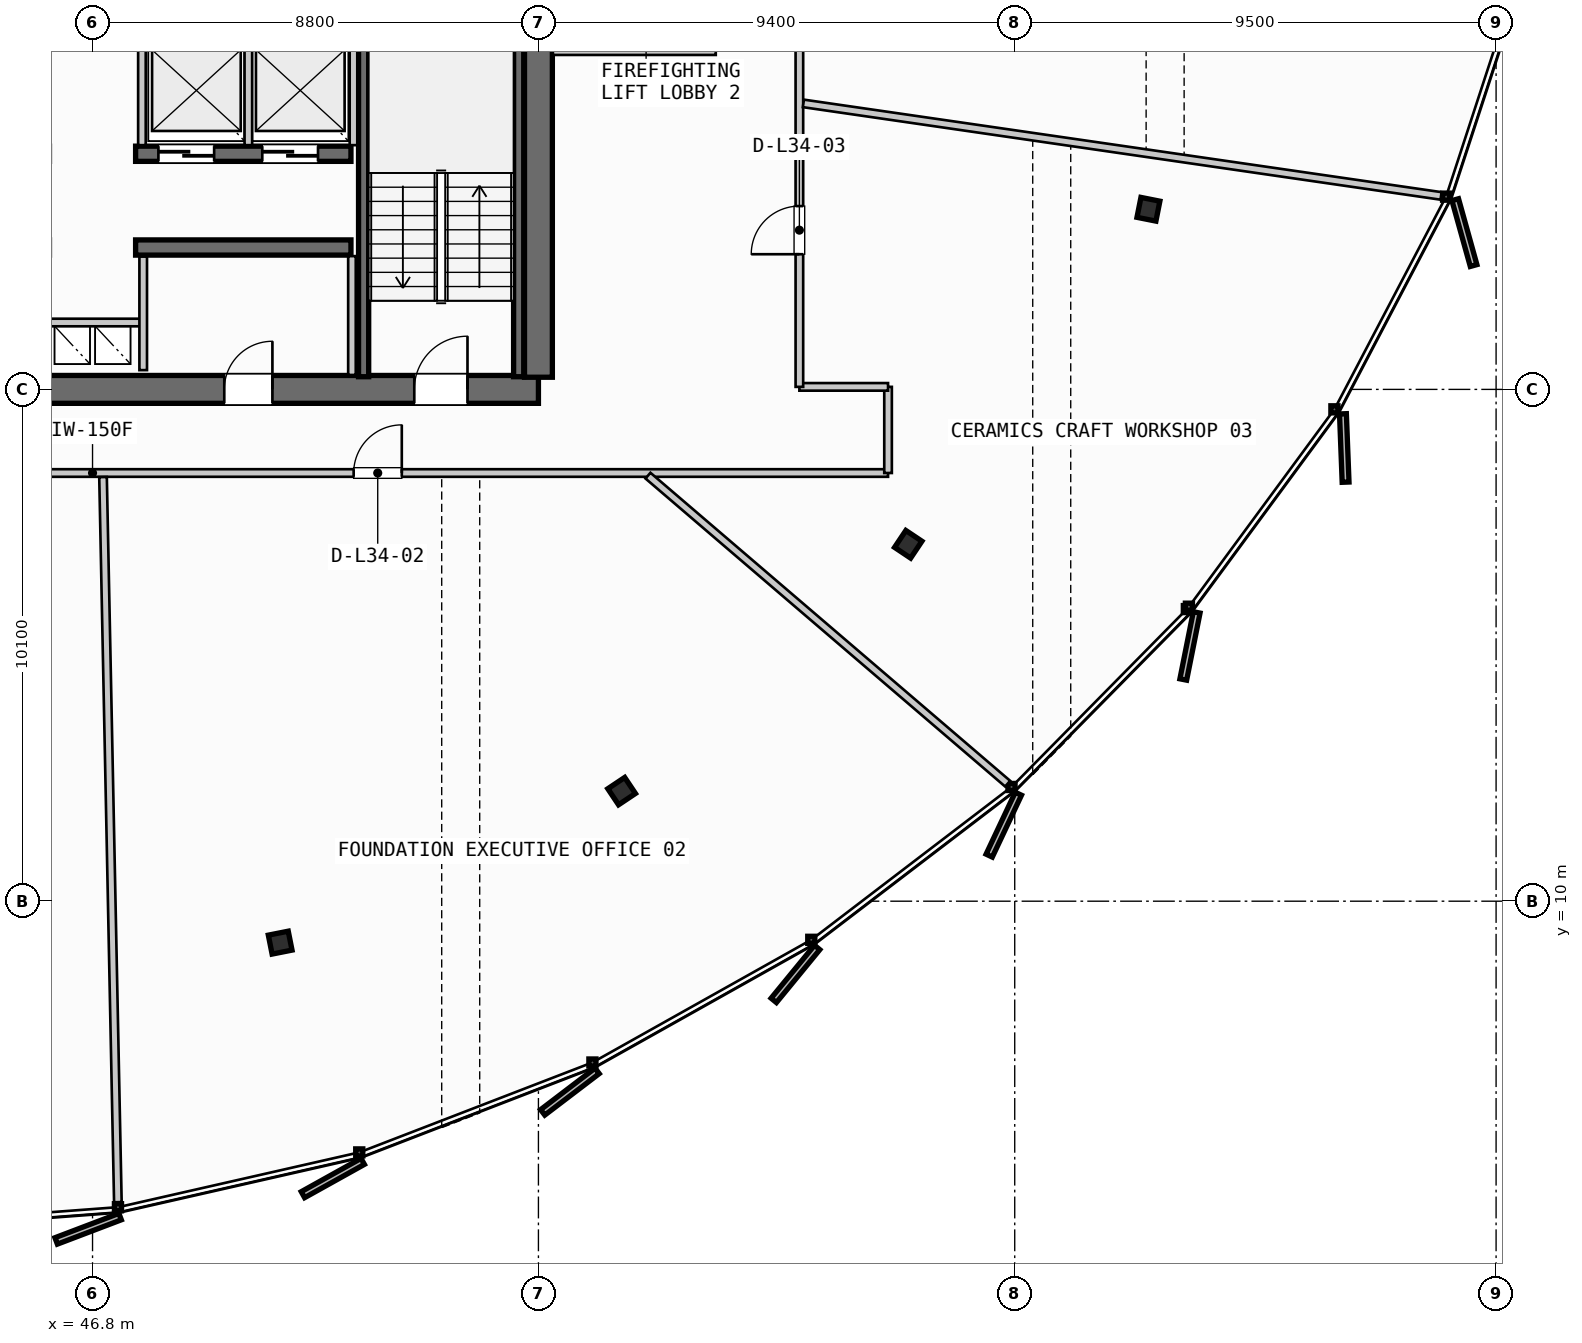
"""IFC4 building model, lengths in metres.
Left out: names, types, materials, properties, quantities, classifications, styles, units other than length and angle.
Written with IfcOpenShell. Run it as: python <this file> out.ifc"""

import sys

from ifc_helpers import new_model, si_unit, direction, frame, frame_2d, origin, origin_2d, place, context, subcontext, project, spatial, rectangle, i_section, extrude, source, transform, mapped, element, fill, save


model = new_model("IFC4")
c1 = context("Model", 3, precision=1e-05, world=origin(), true_north=direction((0.0, 1.0)))
c2 = subcontext(c1, "Body", "Model", "MODEL_VIEW")
j1 = project(units=[si_unit("LENGTHUNIT", "METRE"), si_unit("PLANEANGLEUNIT", "RADIAN")], contexts=[c1])
p1 = place(None, origin())
s1 = spatial("IfcSite", under=j1, at=p1, CompositionType="ELEMENT")
p2 = place(p1, origin())
s2 = spatial("IfcBuilding", under=s1, at=p2, CompositionType="ELEMENT")
p3 = place(p2, frame((0.0, 0.0, 135.9)))
s3 = spatial("IfcBuildingStorey", under=s2, at=p3, CompositionType="ELEMENT", Elevation=135.9)
p4 = place(p3, frame((38.0, 20.1, 0.0), z_axis=(0.0, 0.0, 1.0), x_axis=(1.0, 0.0, 0.0)))
e1 = element("IfcWall", 1, at=p4, inside=s3, PredefinedType="SHEAR", context=c2, shape_type="SweptSolid", body=[
    extrude(rectangle(XDim=17.6, YDim=0.55, at=frame_2d((8.8, 0.0))), origin(), (0.0, 0.0, 1.0), 3.3),
])
p5 = place(p4, frame((1.4, 0.0, 0.0)))
e2 = element("IfcOpeningElement", 2, at=p5, cuts=e1, PredefinedType="OPENING", context=c2, shape_type="SweptSolid", body=[
    extrude(rectangle(XDim=1.05, YDim=2.15, at=frame_2d((0.525, 1.075))), frame((0.0, 0.285, 0.0), z_axis=(0.0, -1.0, 0.0), x_axis=(1.0, 0.0, 0.0)), (0.0, 0.0, 1.0), 0.57),
])
p6 = place(p4, frame((15.15, 0.0, 0.0)))
e3 = element("IfcOpeningElement", 3, at=p6, cuts=e1, PredefinedType="OPENING", context=c2, shape_type="SweptSolid", body=[
    extrude(rectangle(XDim=1.05, YDim=2.15, at=frame_2d((0.525, 1.075))), frame((0.0, 0.285, 0.0), z_axis=(0.0, -1.0, 0.0), x_axis=(1.0, 0.0, 0.0)), (0.0, 0.0, 1.0), 0.57),
])
p7 = place(p4, frame((5.25, 0.0, 0.0)))
e4 = element("IfcOpeningElement", 4, at=p7, cuts=e1, PredefinedType="OPENING", context=c2, shape_type="SweptSolid", body=[
    extrude(rectangle(XDim=0.95, YDim=2.15, at=frame_2d((0.475, 1.075))), frame((0.0, 0.285, 0.0), z_axis=(0.0, -1.0, 0.0), x_axis=(1.0, 0.0, 0.0)), (0.0, 0.0, 1.0), 0.57),
])
p8 = place(p4, frame((11.4, 0.0, 0.0)))
e5 = element("IfcOpeningElement", 5, at=p8, cuts=e1, PredefinedType="OPENING", context=c2, shape_type="SweptSolid", body=[
    extrude(rectangle(XDim=0.95, YDim=2.15, at=frame_2d((0.475, 1.075))), frame((0.0, 0.285, 0.0), z_axis=(0.0, -1.0, 0.0), x_axis=(1.0, 0.0, 0.0)), (0.0, 0.0, 1.0), 0.57),
])
p9 = place(p3, frame((55.6, 20.34, 0.0), z_axis=(0.0, 0.0, 1.0), x_axis=(0.0, 1.0, 0.0)))
e6 = element("IfcWall", 6, at=p9, inside=s3, PredefinedType="SHEAR", context=c2, shape_type="SweptSolid", body=[
    extrude(rectangle(XDim=14.92, YDim=0.55, at=frame_2d((7.46, 0.0))), origin(), (0.0, 0.0, 1.0), 3.3),
])
p10 = place(p9, frame((12.71, 0.0, 0.0)))
e7 = element("IfcOpeningElement", 7, at=p10, cuts=e6, PredefinedType="OPENING", context=c2, shape_type="SweptSolid", body=[
    extrude(rectangle(XDim=1.05, YDim=2.15, at=frame_2d((0.525, 1.075))), frame((0.0, 0.285, 0.0), z_axis=(0.0, -1.0, 0.0), x_axis=(1.0, 0.0, 0.0)), (0.0, 0.0, 1.0), 0.57),
])
p11 = place(p9, frame((8.61, 0.0, 0.0)))
e8 = element("IfcOpeningElement", 8, at=p11, cuts=e6, PredefinedType="OPENING", context=c2, shape_type="SweptSolid", body=[
    extrude(rectangle(XDim=1.1, YDim=2.2, at=frame_2d((0.55, 1.1))), frame((0.0, 0.285, 0.0), z_axis=(0.0, -1.0, 0.0), x_axis=(1.0, 0.0, 0.0)), (0.0, 0.0, 1.0), 0.57),
])
p12 = place(p3, frame((47.65, 22.9, 0.0), z_axis=(0.0, 0.0, 1.0), x_axis=(1.0, 0.0, 0.0)))
e9 = element("IfcWall", 9, at=p12, inside=s3, PredefinedType="SHEAR", context=c2, shape_type="SweptSolid", body=[
    extrude(rectangle(XDim=4.25, YDim=0.3, at=frame_2d((2.125, 0.0))), origin(), (0.0, 0.0, 1.0), 3.3),
])
p13 = place(p3, frame((47.65, 24.75, 0.0), z_axis=(0.0, 0.0, 1.0), x_axis=(1.0, 0.0, 0.0)))
e10 = element("IfcWall", 10, at=p13, inside=s3, PredefinedType="SHEAR", context=c2, shape_type="SweptSolid", body=[
    extrude(rectangle(XDim=4.25, YDim=0.3, at=frame_2d((2.125, 0.0))), origin(), (0.0, 0.0, 1.0), 3.3),
])
p14 = place(p13, frame((0.45, 0.0, 0.0)))
e11 = element("IfcOpeningElement", 11, at=p14, cuts=e10, PredefinedType="OPENING", context=c2, shape_type="SweptSolid", body=[
    extrude(rectangle(XDim=1.1, YDim=2.2, at=frame_2d((0.55, 1.1))), frame((0.0, 0.16, 0.0), z_axis=(0.0, -1.0, 0.0), x_axis=(1.0, 0.0, 0.0)), (0.0, 0.0, 1.0), 0.32),
])
p15 = place(p13, frame((2.5, 0.0, 0.0)))
e12 = element("IfcOpeningElement", 12, at=p15, cuts=e10, PredefinedType="OPENING", context=c2, shape_type="SweptSolid", body=[
    extrude(rectangle(XDim=1.1, YDim=2.2, at=frame_2d((0.55, 1.1))), frame((0.0, 0.16, 0.0), z_axis=(0.0, -1.0, 0.0), x_axis=(1.0, 0.0, 0.0)), (0.0, 0.0, 1.0), 0.32),
])
m1 = source(origin(), c2, "Body", "SweptSolid", [
    extrude(i_section(OverallWidth=0.401, OverallDepth=0.381, WebThickness=0.032, FlangeThickness=0.051, FilletRadius=0.015, at=origin_2d()), origin(), (0.0, 0.0, 1.0), 3.3),
])
for number, where, z_axis, x_axis in (
    (13, (50.503, 9.182, 0.0), (0.0, 0.0, 1.0), (0.195, -0.981, 0.0)),
    (14, (57.242, 12.172, 0.0), (0.0, 0.0, 1.0), (0.556, -0.831, 0.0)),
    (15, (62.899, 17.043, 0.0), (0.0, 0.0, 1.0), (0.831, -0.556, 0.0)),
    (16, (67.639, 23.655, 0.0), (0.0, 0.0, 1.0), (0.981, -0.195, 0.0)),
):
    element("IfcColumn", number, at=place(p3, frame(where, z_axis=z_axis, x_axis=x_axis)), inside=s3, PredefinedType="COLUMN", context=c2, shape_type="MappedRepresentation", body=[
        mapped(m1, transform((0.0, 0.0, 0.0), scale=1.0)),
    ])
for number, where, z_axis, x_axis in (
    (17, (55.21, 27.7, 0.0), (0.0, 0.0, 1.0), (0.0, -1.0, 0.0)),
    (18, (52.15, 20.35, 0.0), (0.0, 0.0, 1.0), (0.0, 1.0, 0.0)),
):
    element("IfcWall", number, at=place(p3, frame(where, z_axis=z_axis, x_axis=x_axis)), inside=s3, PredefinedType="SHEAR", context=c2, shape_type="SweptSolid", body=[
        extrude(rectangle(XDim=7.35, YDim=0.2, at=frame_2d((3.675, 0.0))), origin(), (0.0, 0.0, 1.0), 3.3),
    ])
p16 = place(p3, frame((45.8, 21.42, 0.0), z_axis=(0.0, 0.0, 1.0), x_axis=(1.0, 0.0, 0.0)))
e19 = element("IfcWall", 19, at=p16, inside=s3, PredefinedType="PARTITIONING", context=c2, shape_type="SweptSolid", body=[
    extrude(rectangle(XDim=2.0, YDim=0.15, at=frame_2d((1.0, 0.0))), origin(), (0.0, 0.0, 1.0), 2.445),
])
p17 = place(p3, frame((47.8, 20.48, 0.0), z_axis=(0.0, 0.0, 1.0), x_axis=(0.0, 1.0, 0.0)))
e20 = element("IfcWall", 20, at=p17, inside=s3, PredefinedType="PARTITIONING", context=c2, shape_type="SweptSolid", body=[
    extrude(rectangle(XDim=2.24, YDim=0.15, at=frame_2d((1.12, 0.0))), origin(), (0.0, 0.0, 1.0), 2.445),
])
p18 = place(p3, frame((55.885, 26.8, 0.0), z_axis=(0.0, 0.0, 1.0), x_axis=(1.0, 0.0, 0.0)))
e21 = element("IfcWall", 21, at=p18, inside=s3, PredefinedType="PARTITIONING", context=c2, shape_type="SweptSolid", body=[
    extrude(rectangle(XDim=3.215, YDim=0.2, at=frame_2d((1.607, 0.0))), origin(), (0.0, 0.0, 1.0), 2.445),
])
p19 = place(p3, frame((51.92, 20.385, 0.0), z_axis=(0.0, 0.0, 1.0), x_axis=(0.0, 1.0, 0.0)))
e22 = element("IfcWall", 22, at=p19, inside=s3, PredefinedType="PARTITIONING", context=c2, shape_type="SweptSolid", body=[
    extrude(rectangle(XDim=2.345, YDim=0.15, at=frame_2d((1.172, 0.0))), origin(), (0.0, 0.0, 1.0), 2.445),
])
for number, where, z_axis, x_axis in (
    (23, (47.775, 24.92, 0.0), (0.0, 0.0, 1.0), (0.0, 1.0, 0.0)),
    (24, (49.875, 24.92, 0.0), (0.0, 0.0, 1.0), (0.0, 1.0, 0.0)),
    (25, (51.95, 24.92, 0.0), (0.0, 0.0, 1.0), (0.0, 1.0, 0.0)),
):
    element("IfcWall", number, at=place(p3, frame(where, z_axis=z_axis, x_axis=x_axis)), inside=s3, PredefinedType="PARTITIONING", context=c2, shape_type="SweptSolid", body=[
        extrude(rectangle(XDim=2.32, YDim=0.15, at=frame_2d((1.16, 0.0))), origin(), (0.0, 0.0, 1.0), 2.445),
    ])
p20 = place(p3, frame((31.1, 18.45, 0.0), z_axis=(0.0, 0.0, 1.0), x_axis=(1.0, 0.0, 0.0)))
e26 = element("IfcWall", 26, at=p20, inside=s3, PredefinedType="PARTITIONING", context=c2, shape_type="SweptSolid", body=[
    extrude(rectangle(XDim=31.4, YDim=0.15, at=frame_2d((15.7, 0.0))), origin(), (0.0, 0.0, 1.0), 2.445),
])
p21 = place(p20, frame((10.031, 0.0, 0.0)))
e27 = element("IfcOpeningElement", 27, at=p21, cuts=e26, PredefinedType="OPENING", context=c2, shape_type="SweptSolid", body=[
    extrude(rectangle(XDim=0.95, YDim=2.15, at=frame_2d((0.475, 1.075))), frame((0.0, 0.085, 0.0), z_axis=(0.0, -1.0, 0.0), x_axis=(1.0, 0.0, 0.0)), (0.0, 0.0, 1.0), 0.17),
])
p22 = place(p20, frame((20.854, 0.0, 0.0)))
e28 = element("IfcOpeningElement", 28, at=p22, cuts=e26, PredefinedType="OPENING", context=c2, shape_type="SweptSolid", body=[
    extrude(rectangle(XDim=0.95, YDim=2.15, at=frame_2d((0.475, 1.075))), frame((0.0, 0.085, 0.0), z_axis=(0.0, -1.0, 0.0), x_axis=(1.0, 0.0, 0.0)), (0.0, 0.0, 1.0), 0.17),
])
p23 = place(p3, frame((62.5, 18.45, 0.0), z_axis=(0.0, 0.0, 1.0), x_axis=(0.0, 1.0, 0.0)))
e29 = element("IfcWall", 29, at=p23, inside=s3, PredefinedType="PARTITIONING", context=c2, shape_type="SweptSolid", body=[
    extrude(rectangle(XDim=1.7, YDim=0.15, at=frame_2d((0.85, 0.0))), origin(), (0.0, 0.0, 1.0), 2.445),
])
p24 = place(p3, frame((62.5, 20.15, 0.0), z_axis=(0.0, 0.0, 1.0), x_axis=(-1.0, 0.0, 0.0)))
e30 = element("IfcWall", 30, at=p24, inside=s3, PredefinedType="PARTITIONING", context=c2, shape_type="SweptSolid", body=[
    extrude(rectangle(XDim=1.75, YDim=0.15, at=frame_2d((0.875, 0.0))), origin(), (0.0, 0.0, 1.0), 2.445),
])
p25 = place(p3, frame((60.75, 20.15, 0.0), z_axis=(0.0, 0.0, 1.0), x_axis=(0.0, 1.0, 0.0)))
e31 = element("IfcWall", 31, at=p25, inside=s3, PredefinedType="PARTITIONING", context=c2, shape_type="SweptSolid", body=[
    extrude(rectangle(XDim=15.3, YDim=0.15, at=frame_2d((7.65, 0.0))), origin(), (0.0, 0.0, 1.0), 2.445),
])
p26 = place(p25, frame((2.617, 0.0, 0.0)))
e32 = element("IfcOpeningElement", 32, at=p26, cuts=e31, PredefinedType="OPENING", context=c2, shape_type="SweptSolid", body=[
    extrude(rectangle(XDim=0.95, YDim=2.15, at=frame_2d((0.475, 1.075))), frame((0.0, 0.085, 0.0), z_axis=(0.0, -1.0, 0.0), x_axis=(1.0, 0.0, 0.0)), (0.0, 0.0, 1.0), 0.17),
])
p27 = place(p25, frame((9.686, 0.0, 0.0)))
e33 = element("IfcOpeningElement", 33, at=p27, cuts=e31, PredefinedType="OPENING", context=c2, shape_type="SweptSolid", body=[
    extrude(rectangle(XDim=0.95, YDim=2.15, at=frame_2d((0.475, 1.075))), frame((0.0, 0.085, 0.0), z_axis=(0.0, -1.0, 0.0), x_axis=(1.0, 0.0, 0.0)), (0.0, 0.0, 1.0), 0.17),
])
p28 = place(p3, frame((47.007, 18.37, 0.0), z_axis=(0.0, 0.0, 1.0), x_axis=(0.020469333541, -0.999790481243, 0.0)))
e34 = element("IfcWall", 34, at=p28, inside=s3, PredefinedType="PARTITIONING", context=c2, shape_type="SweptSolid", body=[
    extrude(rectangle(XDim=14.312, YDim=0.15, at=frame_2d((7.156, 0.0))), origin(), (0.0, 0.0, 1.0), 2.445),
])
p29 = place(p3, frame((57.762, 18.398, 0.0), z_axis=(0.0, 0.0, 1.0), x_axis=(0.759568143106, -0.650427733095, 0.0)))
e35 = element("IfcWall", 35, at=p29, inside=s3, PredefinedType="PARTITIONING", context=c2, shape_type="SweptSolid", body=[
    extrude(rectangle(XDim=9.346, YDim=0.15, at=frame_2d((4.673, 0.0))), origin(), (0.0, 0.0, 1.0), 2.445),
])
p30 = place(p3, frame((60.829, 25.744, 0.0), z_axis=(0.0, 0.0, 1.0), x_axis=(0.989638035288, -0.143584675757, 0.0)))
e36 = element("IfcWall", 36, at=p30, inside=s3, PredefinedType="PARTITIONING", context=c2, shape_type="SweptSolid", body=[
    extrude(rectangle(XDim=12.717, YDim=0.15, at=frame_2d((6.358, 0.0))), origin(), (0.0, 0.0, 1.0), 2.445),
])
m2 = source(origin(), c2, "Body", "SweptSolid", [
    extrude(rectangle(XDim=1.05, YDim=2.15, at=frame_2d((0.525, 1.075))), frame((0.0, 0.025, 0.0), z_axis=(0.0, -1.0, 0.0), x_axis=(1.0, 0.0, 0.0)), (0.0, 0.0, 1.0), 0.05),
])
p31 = place(p6, origin())
e37 = element("IfcDoor", 37, at=p31, inside=s3, OperationType="SINGLE_SWING_RIGHT", PredefinedType="DOOR", context=c2, shape_type="MappedRepresentation", body=[
    mapped(m2, transform((0.0, 0.0, 0.0), scale=1.0)),
])
fill(e3, e37)
m3 = source(origin(), c2, "Body", "SweptSolid", [
    extrude(rectangle(XDim=0.95, YDim=2.15, at=frame_2d((0.475, 1.075))), frame((0.0, 0.025, 0.0), z_axis=(0.0, -1.0, 0.0), x_axis=(1.0, 0.0, 0.0)), (0.0, 0.0, 1.0), 0.05),
])
p32 = place(p8, origin())
e38 = element("IfcDoor", 38, at=p32, inside=s3, OperationType="SINGLE_SWING_RIGHT", PredefinedType="DOOR", context=c2, shape_type="MappedRepresentation", body=[
    mapped(m3, transform((0.0, 0.0, 0.0), scale=1.0)),
])
fill(e5, e38)
m4 = source(origin(), c2, "Body", "SweptSolid", [
    extrude(rectangle(XDim=1.1, YDim=2.2, at=frame_2d((0.55, 1.1))), frame((0.0, 0.025, 0.0), z_axis=(0.0, -1.0, 0.0), x_axis=(1.0, 0.0, 0.0)), (0.0, 0.0, 1.0), 0.05),
])
p33 = place(p14, origin())
e39 = element("IfcDoor", 39, at=p33, inside=s3, OperationType="SLIDING_TO_RIGHT", PredefinedType="DOOR", context=c2, shape_type="MappedRepresentation", body=[
    mapped(m4, transform((0.0, 0.0, 0.0), scale=1.0)),
])
fill(e11, e39)
p34 = place(p15, origin())
e40 = element("IfcDoor", 40, at=p34, inside=s3, OperationType="SLIDING_TO_RIGHT", PredefinedType="DOOR", context=c2, shape_type="MappedRepresentation", body=[
    mapped(m4, transform((0.0, 0.0, 0.0), scale=1.0)),
])
fill(e12, e40)
p35 = place(p22, origin())
e41 = element("IfcDoor", 41, at=p35, inside=s3, OperationType="SINGLE_SWING_RIGHT", PredefinedType="DOOR", context=c2, shape_type="MappedRepresentation", body=[
    mapped(m3, transform((0.0, 0.0, 0.0), scale=1.0)),
])
fill(e28, e41)
p36 = place(p26, origin())
e42 = element("IfcDoor", 42, at=p36, inside=s3, OperationType="SINGLE_SWING_LEFT", PredefinedType="DOOR", context=c2, shape_type="MappedRepresentation", body=[
    mapped(m3, transform((0.0, 0.0, 0.0), scale=1.0)),
])
fill(e32, e42)
save(model, sys.argv[1])
